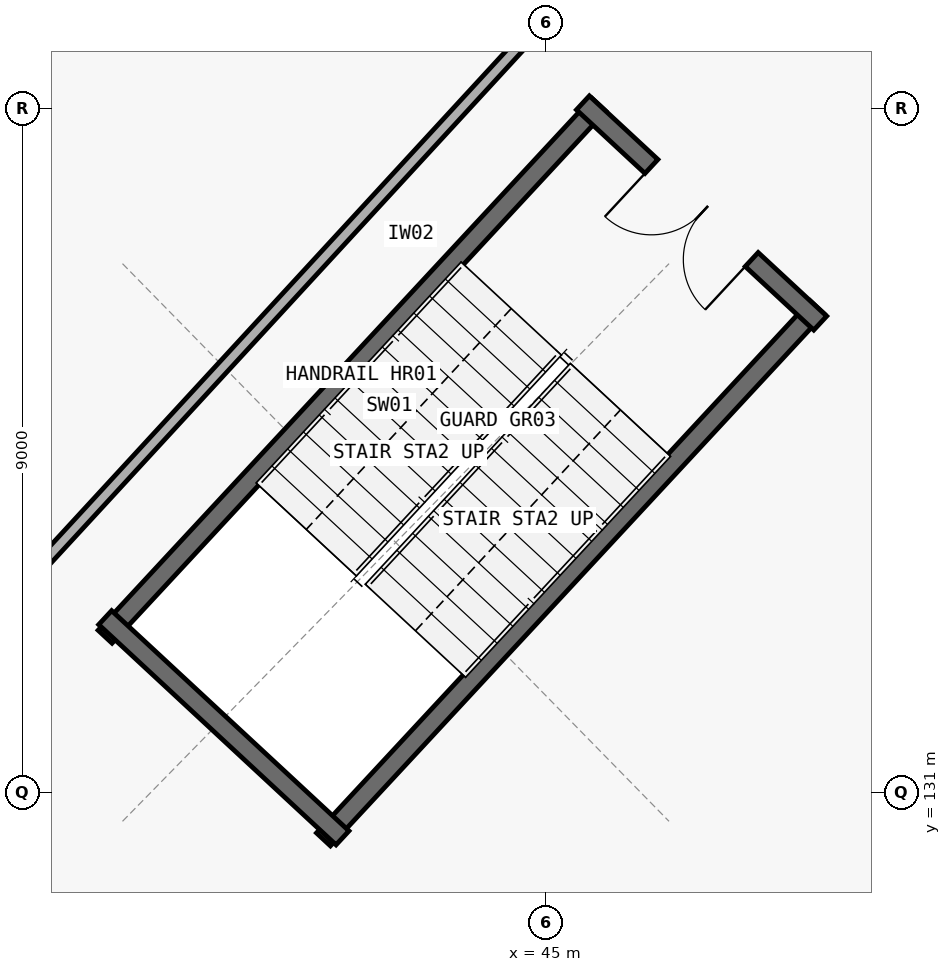
"""IFC4 building model, lengths in metres.
Left out: names, types, materials, properties, quantities, classifications, styles, units other than length and angle.
Written with IfcOpenShell. Run it as: python <this file> out.ifc"""

import sys

from ifc_helpers import new_model, si_unit, direction, frame, frame_2d, origin, place, context, subcontext, project, spatial, rectangle, extrude, element, fill, save


model = new_model("IFC4")
c1 = context("Model", 3, precision=1e-05, world=origin(), true_north=direction((0.0, 1.0)))
c2 = subcontext(c1, "Body", "Model", "MODEL_VIEW")
j1 = project(units=[si_unit("LENGTHUNIT", "METRE"), si_unit("PLANEANGLEUNIT", "RADIAN")], contexts=[c1])
p1 = place(None, origin())
s1 = spatial("IfcSite", under=j1, at=p1, CompositionType="ELEMENT")
p2 = place(p1, origin())
s2 = spatial("IfcBuilding", under=s1, at=p2, CompositionType="ELEMENT")
p3 = place(p2, frame((0.0, 0.0, 10.2)))
s3 = spatial("IfcBuildingStorey", under=s2, at=p3, CompositionType="ELEMENT", Elevation=10.2)
p4 = place(p3, frame((45.694, 140.048, 0.0), z_axis=(0.0, 0.0, 1.0), x_axis=(-0.680257902718, -0.7329728411, 0.0)))
e1 = element("IfcWall", 1, at=p4, inside=s3, PredefinedType="SHEAR", context=c2, shape_type="SweptSolid", body=[
    extrude(rectangle(XDim=9.55, YDim=0.25, at=frame_2d((4.775, 0.0))), origin(), (0.0, 0.0, 1.0), 4.5),
])
p5 = place(p3, frame((42.071, 130.381, 0.0), z_axis=(0.0, 0.0, 1.0), x_axis=(0.680245155897, 0.732984670971, 0.0)))
e2 = element("IfcWall", 2, at=p5, inside=s3, PredefinedType="SHEAR", context=c2, shape_type="SweptSolid", body=[
    extrude(rectangle(XDim=9.55, YDim=0.25, at=frame_2d((4.775, 0.0))), origin(), (0.0, 0.0, 1.0), 4.5),
])
p6 = place(p3, frame((48.607, 137.174, 0.0), z_axis=(0.0, 0.0, 1.0), x_axis=(-0.73295064559, 0.680281817433, 0.0)))
e3 = element("IfcWall", 3, at=p6, inside=s3, PredefinedType="SHEAR", context=c2, shape_type="SweptSolid", body=[
    extrude(rectangle(XDim=4.26, YDim=0.25, at=frame_2d((2.13, 0.0))), origin(), (0.0, 0.0, 1.0), 4.5),
])
p7 = place(p6, frame((1.23, 0.0, 0.0)))
e4 = element("IfcOpeningElement", 4, at=p7, cuts=e3, PredefinedType="OPENING", context=c2, shape_type="SweptSolid", body=[
    extrude(rectangle(XDim=1.8, YDim=2.25, at=frame_2d((0.9, 1.125))), frame((0.0, 0.135, 0.0), z_axis=(0.0, -1.0, 0.0), x_axis=(1.0, 0.0, 0.0)), (0.0, 0.0, 1.0), 0.27),
])
p8 = place(p3, frame((39.199, 133.299, 0.0), z_axis=(0.0, 0.0, 1.0), x_axis=(0.732977166505, -0.680253242096, 0.0)))
e5 = element("IfcWall", 5, at=p8, inside=s3, PredefinedType="SHEAR", context=c2, shape_type="SweptSolid", body=[
    extrude(rectangle(XDim=4.26, YDim=0.25, at=frame_2d((2.13, 0.0))), origin(), (0.0, 0.0, 1.0), 4.5),
])
p9 = place(p3, frame((48.099, 144.573, 0.0), z_axis=(0.0, 0.0, 1.0), x_axis=(-0.677448860536, -0.735569875239, 0.0)))
e6 = element("IfcWall", 6, at=p9, inside=s3, PredefinedType="PARTITIONING", context=c2, shape_type="SweptSolid", body=[
    extrude(rectangle(XDim=20.163, YDim=0.16, at=frame_2d((10.081, 0.0))), origin(), (0.0, 0.0, 1.0), 3.565),
])
p10 = place(p9, frame((15.764, 0.0, 0.0)))
e7 = element("IfcOpeningElement", 7, at=p10, cuts=e6, PredefinedType="OPENING", context=c2, shape_type="SweptSolid", body=[
    extrude(rectangle(XDim=1.3, YDim=2.25, at=frame_2d((0.65, 1.125))), frame((0.0, 0.09, 0.0), z_axis=(0.0, -1.0, 0.0), x_axis=(1.0, 0.0, 0.0)), (0.0, 0.0, 1.0), 0.18),
])
p11 = place(p7, origin())
e8 = element("IfcDoor", 8, at=p11, inside=s3, OperationType="DOUBLE_DOOR_SINGLE_SWING", PredefinedType="DOOR", context=c2, shape_type="SweptSolid", body=[
    extrude(rectangle(XDim=1.8, YDim=2.25, at=frame_2d((0.9, 1.125))), frame((0.0, 0.025, 0.0), z_axis=(0.0, -1.0, 0.0), x_axis=(1.0, 0.0, 0.0)), (0.0, 0.0, 1.0), 0.05),
])
fill(e4, e8)
save(model, sys.argv[1])
